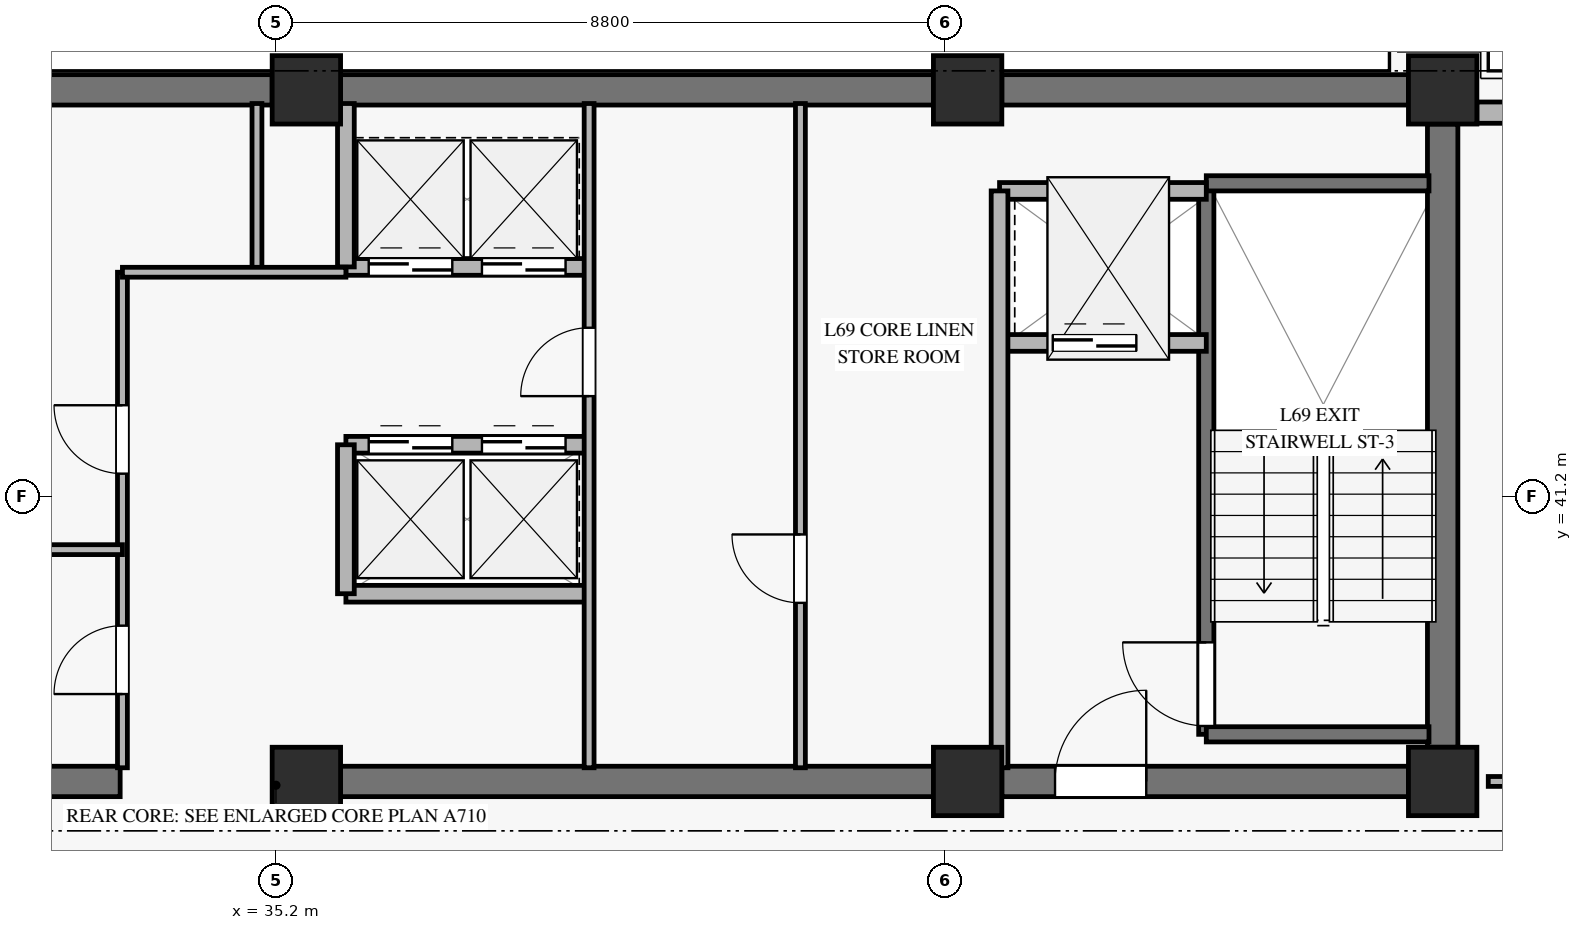
"""IFC4 building model, lengths in metres.
Left out: names, types, materials, properties, quantities, classifications, styles, units other than length and angle.
Written with IfcOpenShell. Run it as: python <this file> out.ifc"""

import sys

from ifc_helpers import new_model, si_unit, direction, frame, frame_2d, origin, origin_2d, place, context, subcontext, project, spatial, rectangle, extrude, source, transform, mapped, element, fill, save


model = new_model("IFC4")
c1 = context("Model", 3, precision=1e-05, world=origin(), true_north=direction((0.0, 1.0)))
c2 = subcontext(c1, "Body", "Model", "MODEL_VIEW")
j1 = project(units=[si_unit("LENGTHUNIT", "METRE"), si_unit("PLANEANGLEUNIT", "RADIAN")], contexts=[c1])
p1 = place(None, origin())
s1 = spatial("IfcSite", under=j1, at=p1, CompositionType="ELEMENT")
p2 = place(p1, origin())
s2 = spatial("IfcBuilding", under=s1, at=p2, CompositionType="ELEMENT")
p3 = place(p2, frame((0.0, 0.0, 268.9)))
s3 = spatial("IfcBuildingStorey", under=s2, at=p3, CompositionType="ELEMENT", Elevation=268.9)
m1 = source(origin(), c2, "Body", "SweptSolid", [
    extrude(rectangle(XDim=0.9, YDim=0.9, at=origin_2d()), origin(), (0.0, 0.0, 1.0), 3.185),
])
for number, where, z_axis, x_axis in (
    (1, (35.6, 37.45, 0.0), (0.0, 0.0, 1.0), (1.0, 0.0, 0.0)),
    (2, (35.6, 46.55, 0.0), (0.0, 0.0, 1.0), (1.0, 0.0, 0.0)),
    (3, (44.3, 37.45, 0.0), (0.0, 0.0, 1.0), (1.0, 0.0, 0.0)),
    (4, (44.3, 46.55, 0.0), (0.0, 0.0, 1.0), (1.0, 0.0, 0.0)),
    (5, (50.55, 37.45, 0.0), (0.0, 0.0, 1.0), (1.0, 0.0, 0.0)),
    (6, (50.55, 46.55, 0.0), (0.0, 0.0, 1.0), (1.0, 0.0, 0.0)),
):
    element("IfcColumn", number, at=place(p3, frame(where, z_axis=z_axis, x_axis=x_axis)), inside=s3, PredefinedType="PILASTER", context=c2, shape_type="MappedRepresentation", body=[
        mapped(m1, transform((0.0, 0.0, 0.0), x_axis=(1.0, 0.0, 0.0), y_axis=(0.0, 1.0, 0.0), z_axis=(0.0, 0.0, 1.0), scale=1.0)),
    ])
p4 = place(p3, frame((31.25, 46.55, 0.0), z_axis=(0.0, 0.0, 1.0), x_axis=(1.0, 0.0, 0.0)))
e7 = element("IfcWall", 7, at=p4, inside=s3, PredefinedType="SHEAR", context=c2, shape_type="SweptSolid", body=[
    extrude(rectangle(XDim=3.9, YDim=0.4, at=frame_2d((1.95, 0.0))), origin(), (0.0, 0.0, 1.0), 3.185),
])
p5 = place(p3, frame((36.05, 46.55, 0.0), z_axis=(0.0, 0.0, 1.0), x_axis=(1.0, 0.0, 0.0)))
e8 = element("IfcWall", 8, at=p5, inside=s3, PredefinedType="SHEAR", context=c2, shape_type="SweptSolid", body=[
    extrude(rectangle(XDim=7.8, YDim=0.4, at=frame_2d((3.9, 0.0))), origin(), (0.0, 0.0, 1.0), 3.185),
])
p6 = place(p3, frame((44.75, 46.55, 0.0), z_axis=(0.0, 0.0, 1.0), x_axis=(1.0, 0.0, 0.0)))
e9 = element("IfcWall", 9, at=p6, inside=s3, PredefinedType="SHEAR", context=c2, shape_type="SweptSolid", body=[
    extrude(rectangle(XDim=5.35, YDim=0.4, at=frame_2d((2.675, 0.0))), origin(), (0.0, 0.0, 1.0), 3.185),
])
p7 = place(p3, frame((31.25, 37.45, 0.0), z_axis=(0.0, 0.0, 1.0), x_axis=(1.0, 0.0, 0.0)))
e10 = element("IfcWall", 10, at=p7, inside=s3, PredefinedType="SHEAR", context=c2, shape_type="SweptSolid", body=[
    extrude(rectangle(XDim=1.9, YDim=0.4, at=frame_2d((0.95, 0.0))), origin(), (0.0, 0.0, 1.0), 3.185),
])
p8 = place(p3, frame((36.05, 37.45, 0.0), z_axis=(0.0, 0.0, 1.0), x_axis=(1.0, 0.0, 0.0)))
e11 = element("IfcWall", 11, at=p8, inside=s3, PredefinedType="SHEAR", context=c2, shape_type="SweptSolid", body=[
    extrude(rectangle(XDim=7.8, YDim=0.4, at=frame_2d((3.9, 0.0))), origin(), (0.0, 0.0, 1.0), 3.185),
])
p9 = place(p3, frame((44.75, 37.45, 0.0), z_axis=(0.0, 0.0, 1.0), x_axis=(1.0, 0.0, 0.0)))
e12 = element("IfcWall", 12, at=p9, inside=s3, PredefinedType="SHEAR", context=c2, shape_type="SweptSolid", body=[
    extrude(rectangle(XDim=5.35, YDim=0.4, at=frame_2d((2.675, 0.0))), origin(), (0.0, 0.0, 1.0), 3.185),
])
p10 = place(p9, frame((0.7, 0.0, 0.0)))
e13 = element("IfcOpeningElement", 13, at=p10, cuts=e12, PredefinedType="OPENING", context=c2, shape_type="SweptSolid", body=[
    extrude(rectangle(XDim=1.2, YDim=2.15, at=frame_2d((0.6, 1.075))), frame((0.0, 0.21, 0.0), z_axis=(0.0, -1.0, 0.0), x_axis=(1.0, 0.0, 0.0)), (0.0, 0.0, 1.0), 0.42),
])
p11 = place(p3, frame((50.55, 37.9, 0.0), z_axis=(0.0, 0.0, 1.0), x_axis=(0.0, 1.0, 0.0)))
e14 = element("IfcWall", 14, at=p11, inside=s3, PredefinedType="SHEAR", context=c2, shape_type="SweptSolid", body=[
    extrude(rectangle(XDim=8.2, YDim=0.4, at=frame_2d((4.1, 0.0))), origin(), (0.0, 0.0, 1.0), 3.185),
])
p12 = place(p3, frame((51.0, 46.25, 0.0), z_axis=(0.0, 0.0, 1.0), x_axis=(1.0, 0.0, 0.0)))
e15 = element("IfcWall", 15, at=p12, inside=s3, PredefinedType="SOLIDWALL", context=c2, shape_type="SweptSolid", body=[
    extrude(rectangle(XDim=7.459, YDim=0.28, at=frame_2d((3.729, 0.0))), origin(), (0.0, 0.0, 1.0), 2.815),
])
p13 = place(p12, frame((2.93, 0.0, 0.45)))
e16 = element("IfcOpeningElement", 16, at=p13, cuts=e15, PredefinedType="OPENING", context=c2, shape_type="SweptSolid", body=[
    extrude(rectangle(XDim=1.6, YDim=2.0, at=frame_2d((0.8, 1.0))), frame((0.0, 0.15, 0.0), z_axis=(0.0, -1.0, 0.0), x_axis=(1.0, 0.0, 0.0)), (0.0, 0.0, 1.0), 0.3),
])
p14 = place(p3, frame((47.44, 38.07, 0.0), z_axis=(0.0, 0.0, 1.0), x_axis=(0.0, 1.0, 0.0)))
e17 = element("IfcWall", 17, at=p14, inside=s3, PredefinedType="SOLIDWALL", context=c2, shape_type="SweptSolid", body=[
    extrude(rectangle(XDim=7.25, YDim=0.2, at=frame_2d((3.625, 0.0))), origin(), (0.0, 0.0, 1.0), 3.4),
])
p15 = place(p14, frame((0.11, 0.0, 0.0)))
e18 = element("IfcOpeningElement", 18, at=p15, cuts=e17, PredefinedType="OPENING", context=c2, shape_type="SweptSolid", body=[
    extrude(rectangle(XDim=1.1, YDim=2.15, at=frame_2d((0.55, 1.075))), frame((0.0, 0.11, 0.0), z_axis=(0.0, -1.0, 0.0), x_axis=(1.0, 0.0, 0.0)), (0.0, 0.0, 1.0), 0.22),
])
for number, where, z_axis, x_axis in (
    (19, (47.44, 45.32, 0.0), (0.0, 0.0, 1.0), (1.0, 0.0, 0.0)),
    (20, (47.44, 38.07, 0.0), (0.0, 0.0, 1.0), (1.0, 0.0, 0.0)),
):
    element("IfcWall", number, at=place(p3, frame(where, z_axis=z_axis, x_axis=x_axis)), inside=s3, PredefinedType="SOLIDWALL", context=c2, shape_type="SweptSolid", body=[
        extrude(rectangle(XDim=2.93, YDim=0.2, at=frame_2d((1.465, 0.0))), origin(), (0.0, 0.0, 1.0), 3.4),
    ])
p16 = place(p3, frame((44.72, 43.22, 0.0), z_axis=(0.0, 0.0, 1.0), x_axis=(1.0, 0.0, 0.0)))
e21 = element("IfcWall", 21, at=p16, inside=s3, PredefinedType="SOLIDWALL", context=c2, shape_type="SweptSolid", body=[
    extrude(rectangle(XDim=2.72, YDim=0.22, at=frame_2d((1.36, 0.0))), origin(), (0.0, 0.0, 1.0), 3.185),
])
p17 = place(p16, frame((0.7, 0.0, 0.0)))
e22 = element("IfcOpeningElement", 22, at=p17, cuts=e21, PredefinedType="OPENING", context=c2, shape_type="SweptSolid", body=[
    extrude(rectangle(XDim=1.1, YDim=2.2, at=frame_2d((0.55, 1.1))), frame((0.0, 0.12, 0.0), z_axis=(0.0, -1.0, 0.0), x_axis=(1.0, 0.0, 0.0)), (0.0, 0.0, 1.0), 0.24),
])
p18 = place(p3, frame((44.72, 45.22, 0.0), z_axis=(0.0, 0.0, 1.0), x_axis=(1.0, 0.0, 0.0)))
e23 = element("IfcWall", 23, at=p18, inside=s3, PredefinedType="SOLIDWALL", context=c2, shape_type="SweptSolid", body=[
    extrude(rectangle(XDim=2.72, YDim=0.22, at=frame_2d((1.36, 0.0))), origin(), (0.0, 0.0, 1.0), 3.185),
])
p19 = place(p3, frame((44.72, 37.63, 0.0), z_axis=(0.0, 0.0, 1.0), x_axis=(0.0, 1.0, 0.0)))
e24 = element("IfcWall", 24, at=p19, inside=s3, PredefinedType="SOLIDWALL", context=c2, shape_type="SweptSolid", body=[
    extrude(rectangle(XDim=7.59, YDim=0.22, at=frame_2d((3.795, 0.0))), origin(), (0.0, 0.0, 1.0), 3.185),
])
p20 = place(p3, frame((36.12, 44.22, 0.0), z_axis=(0.0, 0.0, 1.0), x_axis=(1.0, 0.0, 0.0)))
e25 = element("IfcWall", 25, at=p20, inside=s3, PredefinedType="SOLIDWALL", context=c2, shape_type="SweptSolid", body=[
    extrude(rectangle(XDim=3.2, YDim=0.22, at=frame_2d((1.6, 0.0))), origin(), (0.0, 0.0, 1.0), 3.185),
])
p21 = place(p20, frame((0.3, 0.0, 0.0)))
e26 = element("IfcOpeningElement", 26, at=p21, cuts=e25, PredefinedType="OPENING", context=c2, shape_type="SweptSolid", body=[
    extrude(rectangle(XDim=1.1, YDim=2.2, at=frame_2d((0.55, 1.1))), frame((0.0, 0.12, 0.0), z_axis=(0.0, -1.0, 0.0), x_axis=(1.0, 0.0, 0.0)), (0.0, 0.0, 1.0), 0.24),
])
p22 = place(p20, frame((1.79, 0.0, 0.0)))
e27 = element("IfcOpeningElement", 27, at=p22, cuts=e25, PredefinedType="OPENING", context=c2, shape_type="SweptSolid", body=[
    extrude(rectangle(XDim=1.1, YDim=2.2, at=frame_2d((0.55, 1.1))), frame((0.0, 0.12, 0.0), z_axis=(0.0, -1.0, 0.0), x_axis=(1.0, 0.0, 0.0)), (0.0, 0.0, 1.0), 0.24),
])
p23 = place(p3, frame((36.12, 41.88, 0.0), z_axis=(0.0, 0.0, 1.0), x_axis=(1.0, 0.0, 0.0)))
e28 = element("IfcWall", 28, at=p23, inside=s3, PredefinedType="SOLIDWALL", context=c2, shape_type="SweptSolid", body=[
    extrude(rectangle(XDim=3.2, YDim=0.22, at=frame_2d((1.6, 0.0))), origin(), (0.0, 0.0, 1.0), 3.185),
])
p24 = place(p23, frame((0.3, 0.0, 0.0)))
e29 = element("IfcOpeningElement", 29, at=p24, cuts=e28, PredefinedType="OPENING", context=c2, shape_type="SweptSolid", body=[
    extrude(rectangle(XDim=1.1, YDim=2.2, at=frame_2d((0.55, 1.1))), frame((0.0, 0.12, 0.0), z_axis=(0.0, -1.0, 0.0), x_axis=(1.0, 0.0, 0.0)), (0.0, 0.0, 1.0), 0.24),
])
p25 = place(p23, frame((1.79, 0.0, 0.0)))
e30 = element("IfcOpeningElement", 30, at=p25, cuts=e28, PredefinedType="OPENING", context=c2, shape_type="SweptSolid", body=[
    extrude(rectangle(XDim=1.1, YDim=2.2, at=frame_2d((0.55, 1.1))), frame((0.0, 0.12, 0.0), z_axis=(0.0, -1.0, 0.0), x_axis=(1.0, 0.0, 0.0)), (0.0, 0.0, 1.0), 0.24),
])
p26 = place(p3, frame((36.12, 39.92, 0.0), z_axis=(0.0, 0.0, 1.0), x_axis=(1.0, 0.0, 0.0)))
e31 = element("IfcWall", 31, at=p26, inside=s3, PredefinedType="SOLIDWALL", context=c2, shape_type="SweptSolid", body=[
    extrude(rectangle(XDim=3.2, YDim=0.22, at=frame_2d((1.6, 0.0))), origin(), (0.0, 0.0, 1.0), 3.185),
])
p27 = place(p3, frame((36.12, 39.92, 0.0), z_axis=(0.0, 0.0, 1.0), x_axis=(0.0, 1.0, 0.0)))
e32 = element("IfcWall", 32, at=p27, inside=s3, PredefinedType="SOLIDWALL", context=c2, shape_type="SweptSolid", body=[
    extrude(rectangle(XDim=1.96, YDim=0.22, at=frame_2d((0.98, 0.0))), origin(), (0.0, 0.0, 1.0), 3.185),
])
p28 = place(p3, frame((36.12, 44.22, 0.0), z_axis=(0.0, 0.0, 1.0), x_axis=(0.0, 1.0, 0.0)))
e33 = element("IfcWall", 33, at=p28, inside=s3, PredefinedType="SOLIDWALL", context=c2, shape_type="SweptSolid", body=[
    extrude(rectangle(XDim=2.15, YDim=0.22, at=frame_2d((1.075, 0.0))), origin(), (0.0, 0.0, 1.0), 3.185),
])
p29 = place(p3, frame((33.18, 37.63, 0.0), z_axis=(0.0, 0.0, 1.0), x_axis=(0.0, 1.0, 0.0)))
e34 = element("IfcWall", 34, at=p29, inside=s3, PredefinedType="PARTITIONING", context=c2, shape_type="SweptSolid", body=[
    extrude(rectangle(XDim=6.52, YDim=0.13, at=frame_2d((3.26, 0.0))), origin(), (0.0, 0.0, 1.0), 2.27),
])
p30 = place(p29, frame((0.97, 0.0, 0.0)))
e35 = element("IfcOpeningElement", 35, at=p30, cuts=e34, PredefinedType="OPENING", context=c2, shape_type="SweptSolid", body=[
    extrude(rectangle(XDim=0.9, YDim=2.1, at=frame_2d((0.45, 1.05))), frame((0.0, 0.075, 0.0), z_axis=(0.0, -1.0, 0.0), x_axis=(1.0, 0.0, 0.0)), (0.0, 0.0, 1.0), 0.15),
])
p31 = place(p29, frame((3.87, 0.0, 0.0)))
e36 = element("IfcOpeningElement", 36, at=p31, cuts=e34, PredefinedType="OPENING", context=c2, shape_type="SweptSolid", body=[
    extrude(rectangle(XDim=0.9, YDim=2.1, at=frame_2d((0.45, 1.05))), frame((0.0, 0.075, 0.0), z_axis=(0.0, -1.0, 0.0), x_axis=(1.0, 0.0, 0.0)), (0.0, 0.0, 1.0), 0.15),
])
p32 = place(p3, frame((34.95, 44.15, 0.0), z_axis=(0.0, 0.0, 1.0), x_axis=(0.0, 1.0, 0.0)))
e37 = element("IfcWall", 37, at=p32, inside=s3, PredefinedType="PARTITIONING", context=c2, shape_type="SweptSolid", body=[
    extrude(rectangle(XDim=2.22, YDim=0.13, at=frame_2d((1.11, 0.0))), origin(), (0.0, 0.0, 1.0), 3.185),
])
p33 = place(p3, frame((33.18, 44.15, 0.0), z_axis=(0.0, 0.0, 1.0), x_axis=(1.0, 0.0, 0.0)))
e38 = element("IfcWall", 38, at=p33, inside=s3, PredefinedType="PARTITIONING", context=c2, shape_type="SweptSolid", body=[
    extrude(rectangle(XDim=2.94, YDim=0.13, at=frame_2d((1.47, 0.0))), origin(), (0.0, 0.0, 1.0), 2.47),
])
p34 = place(p3, frame((39.32, 37.63, 0.0), z_axis=(0.0, 0.0, 1.0), x_axis=(0.0, 1.0, 0.0)))
e39 = element("IfcWall", 39, at=p34, inside=s3, PredefinedType="PARTITIONING", context=c2, shape_type="SweptSolid", body=[
    extrude(rectangle(XDim=8.74, YDim=0.13, at=frame_2d((4.37, 0.0))), origin(), (0.0, 0.0, 1.0), 3.185),
])
p35 = place(p34, frame((4.89, 0.0, 0.0)))
e40 = element("IfcOpeningElement", 40, at=p35, cuts=e39, PredefinedType="OPENING", context=c2, shape_type="SweptSolid", body=[
    extrude(rectangle(XDim=0.9, YDim=2.1, at=frame_2d((0.45, 1.05))), frame((0.0, 0.075, 0.0), z_axis=(0.0, -1.0, 0.0), x_axis=(1.0, 0.0, 0.0)), (0.0, 0.0, 1.0), 0.15),
])
p36 = place(p3, frame((30.22, 40.5, 0.0), z_axis=(0.0, 0.0, 1.0), x_axis=(1.0, 0.0, 0.0)))
e41 = element("IfcWall", 41, at=p36, inside=s3, PredefinedType="PARTITIONING", context=c2, shape_type="SweptSolid", body=[
    extrude(rectangle(XDim=2.96, YDim=0.13, at=frame_2d((1.48, 0.0))), origin(), (0.0, 0.0, 1.0), 2.47),
])
p37 = place(p3, frame((42.1, 37.63, 0.0), z_axis=(0.0, 0.0, 1.0), x_axis=(0.0, 1.0, 0.0)))
e42 = element("IfcWall", 42, at=p37, inside=s3, PredefinedType="PARTITIONING", context=c2, shape_type="SweptSolid", body=[
    extrude(rectangle(XDim=8.74, YDim=0.13, at=frame_2d((4.37, 0.0))), origin(), (0.0, 0.0, 1.0), 3.185),
])
p38 = place(p37, frame((2.17, 0.0, 0.0)))
e43 = element("IfcOpeningElement", 43, at=p38, cuts=e42, PredefinedType="OPENING", context=c2, shape_type="SweptSolid", body=[
    extrude(rectangle(XDim=0.9, YDim=2.1, at=frame_2d((0.45, 1.05))), frame((0.0, 0.075, 0.0), z_axis=(0.0, -1.0, 0.0), x_axis=(1.0, 0.0, 0.0)), (0.0, 0.0, 1.0), 0.15),
])
p39 = place(p3, frame((51.15, 37.45, 0.0), z_axis=(0.0, 0.0, 1.0), x_axis=(1.0, 0.0, 0.0)))
e44 = element("IfcWall", 44, at=p39, inside=s3, PredefinedType="PARTITIONING", context=c2, shape_type="SweptSolid", body=[
    extrude(rectangle(XDim=10.057, YDim=0.13, at=frame_2d((5.029, 0.0))), origin(), (0.0, 0.0, 1.0), 2.82),
])
p40 = place(p39, frame((0.5, 0.0, 0.0)))
e45 = element("IfcOpeningElement", 45, at=p40, cuts=e44, PredefinedType="OPENING", context=c2, shape_type="SweptSolid", body=[
    extrude(rectangle(XDim=0.9, YDim=2.1, at=frame_2d((0.45, 1.05))), frame((0.0, 0.075, 0.0), z_axis=(0.0, -1.0, 0.0), x_axis=(1.0, 0.0, 0.0)), (0.0, 0.0, 1.0), 0.15),
])
p41 = place(p39, frame((7.48, 0.0, 0.0)))
e46 = element("IfcOpeningElement", 46, at=p41, cuts=e44, PredefinedType="OPENING", context=c2, shape_type="SweptSolid", body=[
    extrude(rectangle(XDim=0.95, YDim=2.1, at=frame_2d((0.475, 1.05))), frame((0.0, 0.075, 0.0), z_axis=(0.0, -1.0, 0.0), x_axis=(1.0, 0.0, 0.0)), (0.0, 0.0, 1.0), 0.15),
])
m2 = source(origin(), c2, "Body", "SweptSolid", [
    extrude(rectangle(XDim=1.1, YDim=2.15, at=frame_2d((0.55, 1.075))), frame((0.0, 0.025, 0.0), z_axis=(0.0, -1.0, 0.0), x_axis=(1.0, 0.0, 0.0)), (0.0, 0.0, 1.0), 0.05),
])
p42 = place(p15, origin())
e47 = element("IfcDoor", 47, at=p42, inside=s3, OperationType="SINGLE_SWING_RIGHT", PredefinedType="DOOR", context=c2, shape_type="MappedRepresentation", body=[
    mapped(m2, transform((0.0, 0.0, 0.0), x_axis=(1.0, 0.0, 0.0), y_axis=(0.0, 1.0, 0.0), z_axis=(0.0, 0.0, 1.0), scale=1.0)),
])
fill(e18, e47)
m3 = source(origin(), c2, "Body", "SweptSolid", [
    extrude(rectangle(XDim=1.1, YDim=2.2, at=frame_2d((0.55, 1.1))), frame((0.0, 0.025, 0.0), z_axis=(0.0, -1.0, 0.0), x_axis=(1.0, 0.0, 0.0)), (0.0, 0.0, 1.0), 0.05),
])
p43 = place(p17, origin())
e48 = element("IfcDoor", 48, at=p43, inside=s3, OperationType="SLIDING_TO_LEFT", PredefinedType="DOOR", context=c2, shape_type="MappedRepresentation", body=[
    mapped(m3, transform((0.0, 0.0, 0.0), x_axis=(1.0, 0.0, 0.0), y_axis=(0.0, 1.0, 0.0), z_axis=(0.0, 0.0, 1.0), scale=1.0)),
])
fill(e22, e48)
m4 = source(origin(), c2, "Body", "SweptSolid", [
    extrude(rectangle(XDim=1.2, YDim=2.15, at=frame_2d((0.6, 1.075))), frame((0.0, 0.025, 0.0), z_axis=(0.0, -1.0, 0.0), x_axis=(1.0, 0.0, 0.0)), (0.0, 0.0, 1.0), 0.05),
])
p44 = place(p10, origin())
e49 = element("IfcDoor", 49, at=p44, inside=s3, OperationType="SINGLE_SWING_RIGHT", PredefinedType="DOOR", context=c2, shape_type="MappedRepresentation", body=[
    mapped(m4, transform((0.0, 0.0, 0.0), x_axis=(1.0, 0.0, 0.0), y_axis=(0.0, 1.0, 0.0), z_axis=(0.0, 0.0, 1.0), scale=1.0)),
])
fill(e13, e49)
p45 = place(p21, origin())
e50 = element("IfcDoor", 50, at=p45, inside=s3, OperationType="SLIDING_TO_LEFT", PredefinedType="DOOR", context=c2, shape_type="MappedRepresentation", body=[
    mapped(m3, transform((0.0, 0.0, 0.0), x_axis=(1.0, 0.0, 0.0), y_axis=(0.0, 1.0, 0.0), z_axis=(0.0, 0.0, 1.0), scale=1.0)),
])
fill(e26, e50)
p46 = place(p22, origin())
e51 = element("IfcDoor", 51, at=p46, inside=s3, OperationType="SLIDING_TO_LEFT", PredefinedType="DOOR", context=c2, shape_type="MappedRepresentation", body=[
    mapped(m3, transform((0.0, 0.0, 0.0), x_axis=(1.0, 0.0, 0.0), y_axis=(0.0, 1.0, 0.0), z_axis=(0.0, 0.0, 1.0), scale=1.0)),
])
fill(e27, e51)
p47 = place(p24, origin())
e52 = element("IfcDoor", 52, at=p47, inside=s3, OperationType="SLIDING_TO_LEFT", PredefinedType="DOOR", context=c2, shape_type="MappedRepresentation", body=[
    mapped(m3, transform((0.0, 0.0, 0.0), x_axis=(1.0, 0.0, 0.0), y_axis=(0.0, 1.0, 0.0), z_axis=(0.0, 0.0, 1.0), scale=1.0)),
])
fill(e29, e52)
p48 = place(p25, origin())
e53 = element("IfcDoor", 53, at=p48, inside=s3, OperationType="SLIDING_TO_LEFT", PredefinedType="DOOR", context=c2, shape_type="MappedRepresentation", body=[
    mapped(m3, transform((0.0, 0.0, 0.0), x_axis=(1.0, 0.0, 0.0), y_axis=(0.0, 1.0, 0.0), z_axis=(0.0, 0.0, 1.0), scale=1.0)),
])
fill(e30, e53)
m5 = source(origin(), c2, "Body", "SweptSolid", [
    extrude(rectangle(XDim=0.9, YDim=2.1, at=frame_2d((0.45, 1.05))), frame((0.0, 0.025, 0.0), z_axis=(0.0, -1.0, 0.0), x_axis=(1.0, 0.0, 0.0)), (0.0, 0.0, 1.0), 0.05),
])
p49 = place(p30, origin())
e54 = element("IfcDoor", 54, at=p49, inside=s3, OperationType="SINGLE_SWING_LEFT", PredefinedType="DOOR", context=c2, shape_type="MappedRepresentation", body=[
    mapped(m5, transform((0.0, 0.0, 0.0), x_axis=(1.0, 0.0, 0.0), y_axis=(0.0, 1.0, 0.0), z_axis=(0.0, 0.0, 1.0), scale=1.0)),
])
fill(e35, e54)
p50 = place(p31, origin())
e55 = element("IfcDoor", 55, at=p50, inside=s3, OperationType="SINGLE_SWING_RIGHT", PredefinedType="DOOR", context=c2, shape_type="MappedRepresentation", body=[
    mapped(m5, transform((0.0, 0.0, 0.0), x_axis=(1.0, 0.0, 0.0), y_axis=(0.0, 1.0, 0.0), z_axis=(0.0, 0.0, 1.0), scale=1.0)),
])
fill(e36, e55)
p51 = place(p35, origin())
e56 = element("IfcDoor", 56, at=p51, inside=s3, OperationType="SINGLE_SWING_LEFT", PredefinedType="DOOR", context=c2, shape_type="MappedRepresentation", body=[
    mapped(m5, transform((0.0, 0.0, 0.0), x_axis=(1.0, 0.0, 0.0), y_axis=(0.0, 1.0, 0.0), z_axis=(0.0, 0.0, 1.0), scale=1.0)),
])
fill(e40, e56)
p52 = place(p38, origin())
e57 = element("IfcDoor", 57, at=p52, inside=s3, OperationType="SINGLE_SWING_RIGHT", PredefinedType="DOOR", context=c2, shape_type="MappedRepresentation", body=[
    mapped(m5, transform((0.0, 0.0, 0.0), x_axis=(1.0, 0.0, 0.0), y_axis=(0.0, 1.0, 0.0), z_axis=(0.0, 0.0, 1.0), scale=1.0)),
])
fill(e43, e57)
save(model, sys.argv[1])
